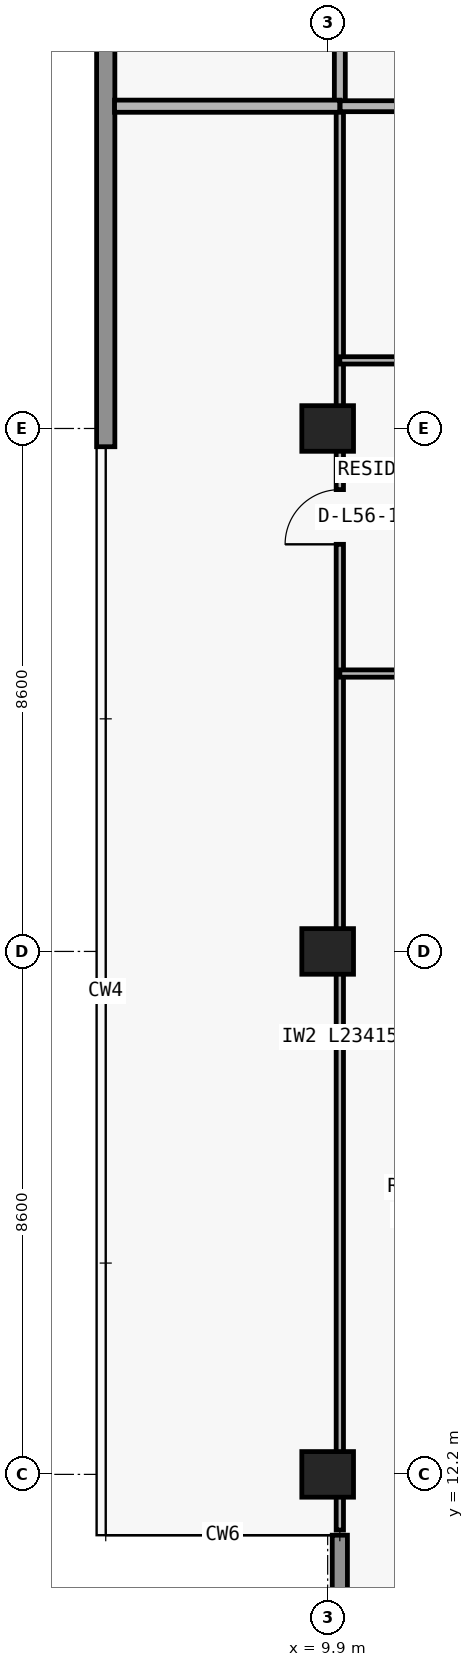
"""IFC4 building model, lengths in metres.
Left out: names, types, materials, properties, quantities, classifications, styles, units other than length and angle.
Written with IfcOpenShell. Run it as: python <this file> out.ifc"""

import sys

from ifc_helpers import new_model, si_unit, direction, frame, frame_2d, origin, origin_2d, place, context, subcontext, project, spatial, rectangle, extrude, element, fill, save


model = new_model("IFC4")
c1 = context("Model", 3, precision=1e-05, world=origin(), true_north=direction((0.0, 1.0)))
c2 = subcontext(c1, "Body", "Model", "MODEL_VIEW")
j1 = project(units=[si_unit("LENGTHUNIT", "METRE"), si_unit("PLANEANGLEUNIT", "RADIAN")], contexts=[c1])
p1 = place(None, origin())
s1 = spatial("IfcSite", under=j1, at=p1, CompositionType="ELEMENT")
p2 = place(p1, origin())
s2 = spatial("IfcBuilding", under=s1, at=p2, CompositionType="ELEMENT")
p3 = place(p2, frame((0.0, 0.0, 201.6)))
s3 = spatial("IfcBuildingStorey", under=s2, at=p3, CompositionType="ELEMENT", Elevation=201.6)
for number, where, z_axis, x_axis in (
    (1, (9.9, 12.2, 0.0), (0.0, 0.0, 1.0), (1.0, 0.0, 0.0)),
    (2, (9.9, 20.8, 0.0), (0.0, 0.0, 1.0), (1.0, 0.0, 0.0)),
    (3, (9.9, 29.4, 0.0), (0.0, 0.0, 1.0), (1.0, 0.0, 0.0)),
):
    element("IfcColumn", number, at=place(p3, frame(where, z_axis=z_axis, x_axis=x_axis)), inside=s3, PredefinedType="COLUMN", context=c2, shape_type="SweptSolid", body=[
        extrude(rectangle(XDim=0.85, YDim=0.75, at=origin_2d()), origin(), (0.0, 0.0, 1.0), 3.05),
    ])
p4 = place(p3, frame((10.1, 11.2, 0.0), z_axis=(0.0, 0.0, 1.0), x_axis=(0.0, -1.0, 0.0)))
e4 = element("IfcWall", 4, at=p4, inside=s3, PredefinedType="ELEMENTEDWALL", context=c2, shape_type="SweptSolid", body=[
    extrude(rectangle(XDim=3.45, YDim=0.25, at=frame_2d((1.725, 0.0))), origin(), (0.0, 0.0, 1.0), 3.05),
])
p5 = place(p3, frame((6.25, 29.1, 0.0), z_axis=(0.0, 0.0, 1.0), x_axis=(0.0, 1.0, 0.0)))
e5 = element("IfcWall", 5, at=p5, inside=s3, PredefinedType="STANDARD", context=c2, shape_type="SweptSolid", body=[
    extrude(rectangle(XDim=17.9, YDim=0.3, at=frame_2d((8.95, 0.0))), origin(), (0.0, 0.0, 1.0), 3.05),
])
p6 = place(p3, frame((10.1, 11.285, 0.0), z_axis=(0.0, 0.0, 1.0), x_axis=(0.0, 1.0, 0.0)))
e6 = element("IfcWall", 6, at=p6, inside=s3, PredefinedType="PARTITIONING", context=c2, shape_type="SweptSolid", body=[
    extrude(rectangle(XDim=23.415, YDim=0.12, at=frame_2d((11.708, 0.0))), origin(), (0.0, 0.0, 1.0), 2.263),
])
p7 = place(p6, frame((16.21, 0.0, 0.0)))
e7 = element("IfcOpeningElement", 7, at=p7, cuts=e6, PredefinedType="OPENING", context=c2, shape_type="SweptSolid", body=[
    extrude(rectangle(XDim=0.9, YDim=2.15, at=frame_2d((0.45, 1.075))), frame((0.0, 0.07, 0.0), z_axis=(0.0, -1.0, 0.0), x_axis=(1.0, 0.0, 0.0)), (0.0, 0.0, 1.0), 0.14),
])
p8 = place(p3, frame((10.1, 34.705, 0.0), z_axis=(0.0, 0.0, 1.0), x_axis=(0.0, 1.0, 0.0)))
e8 = element("IfcWall", 8, at=p8, inside=s3, PredefinedType="PARTITIONING", context=c2, shape_type="SweptSolid", body=[
    extrude(rectangle(XDim=2.295, YDim=0.18, at=frame_2d((1.147, 0.0))), origin(), (0.0, 0.0, 1.0), 2.263),
])
p9 = place(p3, frame((10.1, 25.37, 0.0), z_axis=(0.0, 0.0, 1.0), x_axis=(1.0, 0.0, 0.0)))
e9 = element("IfcWall", 9, at=p9, inside=s3, PredefinedType="PARTITIONING", context=c2, shape_type="SweptSolid", body=[
    extrude(rectangle(XDim=8.2, YDim=0.12, at=frame_2d((4.1, 0.0))), origin(), (0.0, 0.0, 1.0), 3.05),
])
p10 = place(p9, frame((1.477, 0.0, 0.0)))
e10 = element("IfcOpeningElement", 10, at=p10, cuts=e9, PredefinedType="OPENING", context=c2, shape_type="SweptSolid", body=[
    extrude(rectangle(XDim=0.9, YDim=2.15, at=frame_2d((0.45, 1.075))), frame((0.0, 0.07, 0.0), z_axis=(0.0, -1.0, 0.0), x_axis=(1.0, 0.0, 0.0)), (0.0, 0.0, 1.0), 0.14),
])
p11 = place(p9, frame((5.989, 0.0, 0.0)))
e11 = element("IfcOpeningElement", 11, at=p11, cuts=e9, PredefinedType="OPENING", context=c2, shape_type="SweptSolid", body=[
    extrude(rectangle(XDim=0.9, YDim=2.15, at=frame_2d((0.45, 1.075))), frame((0.0, 0.07, 0.0), z_axis=(0.0, -1.0, 0.0), x_axis=(1.0, 0.0, 0.0)), (0.0, 0.0, 1.0), 0.14),
])
p12 = place(p3, frame((10.1, 30.52, 0.0), z_axis=(0.0, 0.0, 1.0), x_axis=(1.0, 0.0, 0.0)))
e12 = element("IfcWall", 12, at=p12, inside=s3, PredefinedType="PARTITIONING", context=c2, shape_type="SweptSolid", body=[
    extrude(rectangle(XDim=8.2, YDim=0.12, at=frame_2d((4.1, 0.0))), origin(), (0.0, 0.0, 1.0), 3.05),
])
p13 = place(p12, frame((1.889, 0.0, 0.0)))
e13 = element("IfcOpeningElement", 13, at=p13, cuts=e12, PredefinedType="OPENING", context=c2, shape_type="SweptSolid", body=[
    extrude(rectangle(XDim=0.9, YDim=2.15, at=frame_2d((0.45, 1.075))), frame((0.0, 0.07, 0.0), z_axis=(0.0, -1.0, 0.0), x_axis=(1.0, 0.0, 0.0)), (0.0, 0.0, 1.0), 0.14),
])
p14 = place(p3, frame((6.395, 34.7, 0.0), z_axis=(0.0, 0.0, 1.0), x_axis=(1.0, 0.0, 0.0)))
e14 = element("IfcWall", 14, at=p14, inside=s3, PredefinedType="PARTITIONING", context=c2, shape_type="SweptSolid", body=[
    extrude(rectangle(XDim=3.705, YDim=0.2, at=frame_2d((1.853, 0.0))), origin(), (0.0, 0.0, 1.0), 3.05),
])
p15 = place(p3, frame((10.105, 34.7, 0.0), z_axis=(0.0, 0.0, 1.0), x_axis=(1.0, 0.0, 0.0)))
e15 = element("IfcWall", 15, at=p15, inside=s3, PredefinedType="PARTITIONING", context=c2, shape_type="SweptSolid", body=[
    extrude(rectangle(XDim=31.021, YDim=0.18, at=frame_2d((15.51, 0.0))), origin(), (0.0, 0.0, 1.0), 3.05),
])
p16 = place(p15, frame((2.365, 0.0, 0.0)))
e16 = element("IfcOpeningElement", 16, at=p16, cuts=e15, PredefinedType="OPENING", context=c2, shape_type="SweptSolid", body=[
    extrude(rectangle(XDim=1.0, YDim=2.2, at=frame_2d((0.5, 1.1))), frame((0.0, 0.1, 0.0), z_axis=(0.0, -1.0, 0.0), x_axis=(1.0, 0.0, 0.0)), (0.0, 0.0, 1.0), 0.2),
])
p17 = place(p15, frame((10.833, 0.0, 0.0)))
e17 = element("IfcOpeningElement", 17, at=p17, cuts=e15, PredefinedType="OPENING", context=c2, shape_type="SweptSolid", body=[
    extrude(rectangle(XDim=1.0, YDim=2.2, at=frame_2d((0.5, 1.1))), frame((0.0, 0.1, 0.0), z_axis=(0.0, -1.0, 0.0), x_axis=(1.0, 0.0, 0.0)), (0.0, 0.0, 1.0), 0.2),
])
p18 = place(p15, frame((19.422, 0.0, 0.0)))
e18 = element("IfcOpeningElement", 18, at=p18, cuts=e15, PredefinedType="OPENING", context=c2, shape_type="SweptSolid", body=[
    extrude(rectangle(XDim=1.0, YDim=2.2, at=frame_2d((0.5, 1.1))), frame((0.0, 0.1, 0.0), z_axis=(0.0, -1.0, 0.0), x_axis=(1.0, 0.0, 0.0)), (0.0, 0.0, 1.0), 0.2),
])
p19 = place(p7, origin())
e19 = element("IfcDoor", 19, at=p19, inside=s3, OperationType="SINGLE_SWING_LEFT", PredefinedType="DOOR", context=c2, shape_type="SweptSolid", body=[
    extrude(rectangle(XDim=0.9, YDim=2.15, at=frame_2d((0.45, 1.075))), frame((0.0, 0.025, 0.0), z_axis=(0.0, -1.0, 0.0), x_axis=(1.0, 0.0, 0.0)), (0.0, 0.0, 1.0), 0.05),
])
fill(e7, e19)
save(model, sys.argv[1])
